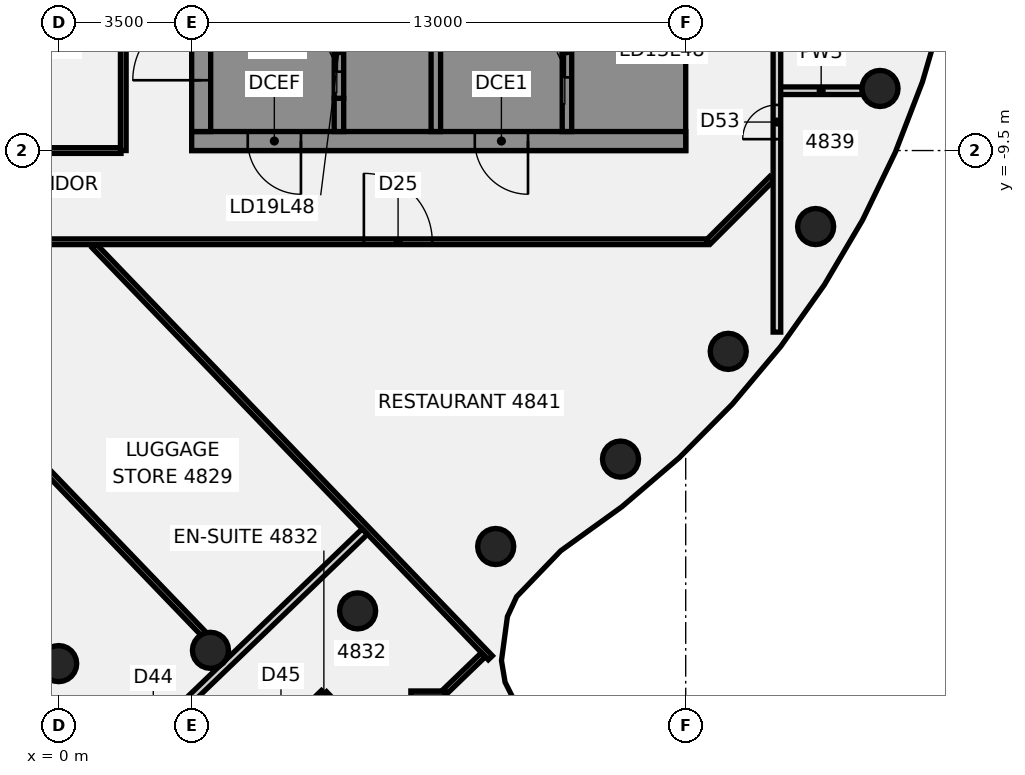
"""IFC4 building model, lengths in metres.
Left out: names, types, materials, properties, quantities, classifications, styles, units other than length and angle.
Written with IfcOpenShell. Run it as: python <this file> out.ifc"""

import sys

from ifc_helpers import new_model, si_unit, direction, frame, frame_2d, origin, origin_2d, place, context, subcontext, project, spatial, polyline, rectangle, circle, outline, extrude, element, fill, save


model = new_model("IFC4")
c1 = context("Model", 3, precision=1e-05, world=origin(), true_north=direction((0.0, 1.0)))
c2 = subcontext(c1, "Body", "Model", "MODEL_VIEW")
j1 = project(units=[si_unit("LENGTHUNIT", "METRE"), si_unit("PLANEANGLEUNIT", "RADIAN")], contexts=[c1])
p1 = place(None, origin())
s1 = spatial("IfcSite", under=j1, at=p1, CompositionType="ELEMENT")
p2 = place(p1, origin())
s2 = spatial("IfcBuilding", under=s1, at=p2, CompositionType="ELEMENT")
p3 = place(p2, frame((0.0, 0.0, 193.3)))
s3 = spatial("IfcBuildingStorey", under=s2, at=p3, CompositionType="ELEMENT", Elevation=193.3)
for number, where, z_axis, x_axis in (
    (1, (0.0, -23.0, -0.14), (0.0, 0.0, 1.0), (1.0, 0.0, 0.0)),
    (2, (3.994, -22.651, -0.14), (0.0, 0.0, 1.0), (1.0, 0.0, 0.0)),
    (3, (7.866, -21.613, -0.14), (0.0, 0.0, 1.0), (1.0, 0.0, 0.0)),
    (4, (11.5, -19.919, -0.14), (0.0, 0.0, 1.0), (1.0, 0.0, 0.0)),
    (5, (14.784, -17.619, -0.14), (0.0, 0.0, 1.0), (1.0, 0.0, 0.0)),
    (6, (17.619, -14.784, -0.14), (0.0, 0.0, 1.0), (1.0, 0.0, 0.0)),
    (7, (19.919, -11.5, -0.14), (0.0, 0.0, 1.0), (1.0, 0.0, 0.0)),
    (8, (21.613, -7.866, -0.14), (0.0, 0.0, 1.0), (1.0, 0.0, 0.0)),
):
    element("IfcColumn", number, at=place(p3, frame(where, z_axis=z_axis, x_axis=x_axis)), inside=s3, PredefinedType="COLUMN", context=c2, shape_type="SweptSolid", body=[
        extrude(circle(Radius=0.475, at=origin_2d()), origin(), (0.0, 0.0, 1.0), 3.6),
    ])
p4 = place(p3, frame((9.718, -24.17, -0.139), z_axis=(0.010573584179, 0.04927561345, 0.998729249215), x_axis=(-0.721101561283, -0.691569981719, 0.041755223636)))
e9 = element("IfcColumn", 9, at=p4, inside=s3, PredefinedType="COLUMN", context=c2, shape_type="SweptSolid", body=[
    extrude(rectangle(XDim=0.9, YDim=0.9, at=origin_2d()), origin(), (0.0, 0.0, 1.0), 3.602),
])
p5 = place(p3, frame((-11.522, -13.769, 0.0), z_axis=(0.0, 0.0, 1.0), x_axis=(0.693150251381, -0.720793124974, 0.0)))
e10 = element("IfcWall", 10, at=p5, inside=s3, PredefinedType="PARTITIONING", context=c2, shape_type="SweptSolid", body=[
    extrude(rectangle(XDim=17.62, YDim=0.15, at=frame_2d((8.81, 0.0))), origin(), (0.0, 0.0, 1.0), 2.864),
])
p6 = place(p5, frame((9.22, 0.0, 0.0)))
e11 = element("IfcOpeningElement", 11, at=p6, cuts=e10, PredefinedType="OPENING", context=c2, shape_type="SweptSolid", body=[
    extrude(rectangle(XDim=1.8, YDim=2.1, at=frame_2d((0.9, 1.05))), frame((0.0, 0.085, 0.0), z_axis=(0.0, -1.0, 0.0), x_axis=(1.0, 0.0, 0.0)), (0.0, 0.0, 1.0), 0.17),
])
p7 = place(p3, frame((-6.002, -12.008, 0.0), z_axis=(0.0, 0.0, 1.0), x_axis=(0.693152131844, -0.720791316624, 0.0)))
e12 = element("IfcWall", 12, at=p7, inside=s3, PredefinedType="PARTITIONING", context=c2, shape_type="SweptSolid", body=[
    extrude(rectangle(XDim=14.159, YDim=0.15, at=frame_2d((7.08, 0.0))), origin(), (0.0, 0.0, 1.0), 2.864),
])
p8 = place(p7, frame((4.65, 0.0, 0.0)))
e13 = element("IfcOpeningElement", 13, at=p8, cuts=e12, PredefinedType="OPENING", context=c2, shape_type="SweptSolid", body=[
    extrude(rectangle(XDim=0.9, YDim=2.1, at=frame_2d((0.45, 1.05))), frame((0.0, 0.085, 0.0), z_axis=(0.0, -1.0, 0.0), x_axis=(1.0, 0.0, 0.0)), (0.0, 0.0, 1.0), 0.17),
])
p9 = place(p3, frame((0.935, -12.008, 0.0), z_axis=(0.0, 0.0, 1.0), x_axis=(0.693163548461, -0.72078033761, 0.0)))
e14 = element("IfcWall", 14, at=p9, inside=s3, PredefinedType="PARTITIONING", context=c2, shape_type="SweptSolid", body=[
    extrude(rectangle(XDim=15.037, YDim=0.15, at=frame_2d((7.519, 0.0))), origin(), (0.0, 0.0, 1.0), 2.864),
])
p10 = place(p3, frame((6.995, -23.792, 0.0), z_axis=(0.0, 0.0, 1.0), x_axis=(0.693326664986, -0.72062343538, 0.0)))
e15 = element("IfcWall", 15, at=p10, inside=s3, PredefinedType="PARTITIONING", context=c2, shape_type="SweptSolid", body=[
    extrude(rectangle(XDim=4.32, YDim=0.15, at=frame_2d((2.16, 0.0))), origin(), (0.0, 0.0, 1.0), 2.864),
])
p11 = place(p3, frame((-17.1, -11.9, 0.0), z_axis=(0.0, 0.0, 1.0), x_axis=(1.0, 0.0, 0.0)))
e16 = element("IfcWall", 16, at=p11, inside=s3, PredefinedType="PARTITIONING", context=c2, shape_type="SweptSolid", body=[
    extrude(rectangle(XDim=34.165, YDim=0.15, at=frame_2d((17.083, 0.0))), origin(), (0.0, 0.0, 1.0), 2.864),
])
p12 = place(p11, frame((8.305, 0.0, 0.0)))
e17 = element("IfcOpeningElement", 17, at=p12, cuts=e16, PredefinedType="OPENING", context=c2, shape_type="SweptSolid", body=[
    extrude(rectangle(XDim=1.8, YDim=2.1, at=frame_2d((0.9, 1.05))), frame((0.0, 0.085, 0.0), z_axis=(0.0, -1.0, 0.0), x_axis=(1.0, 0.0, 0.0)), (0.0, 0.0, 1.0), 0.17),
])
p13 = place(p11, frame((2.1, 0.0, 0.0)))
e18 = element("IfcOpeningElement", 18, at=p13, cuts=e16, PredefinedType="OPENING", context=c2, shape_type="SweptSolid", body=[
    extrude(rectangle(XDim=1.8, YDim=2.1, at=frame_2d((0.9, 1.05))), frame((0.0, 0.085, 0.0), z_axis=(0.0, -1.0, 0.0), x_axis=(1.0, 0.0, 0.0)), (0.0, 0.0, 1.0), 0.17),
])
p14 = place(p11, frame((25.131, 0.0, 0.0)))
e19 = element("IfcOpeningElement", 19, at=p14, cuts=e16, PredefinedType="OPENING", context=c2, shape_type="SweptSolid", body=[
    extrude(rectangle(XDim=1.8, YDim=2.1, at=frame_2d((0.9, 1.05))), frame((0.0, 0.085, 0.0), z_axis=(0.0, -1.0, 0.0), x_axis=(1.0, 0.0, 0.0)), (0.0, 0.0, 1.0), 0.17),
])
p15 = place(p3, frame((-1.64, -9.5, 0.0), z_axis=(0.0, 0.0, 1.0), x_axis=(1.0, 0.0, 0.0)))
e20 = element("IfcWall", 20, at=p15, inside=s3, PredefinedType="PARTITIONING", context=c2, shape_type="SweptSolid", body=[
    extrude(rectangle(XDim=3.28, YDim=0.15, at=frame_2d((1.64, 0.0))), origin(), (0.0, 0.0, 1.0), 2.864),
])
p16 = place(p3, frame((18.985, -7.926, 0.0), z_axis=(0.0, 0.0, 1.0), x_axis=(1.0, 0.0, 0.0)))
e21 = element("IfcWall", 21, at=p16, inside=s3, PredefinedType="PARTITIONING", context=c2, shape_type="SweptSolid", body=[
    extrude(rectangle(XDim=2.159, YDim=0.2, at=frame_2d((1.079, 0.0))), origin(), (0.0, 0.0, 1.0), 2.864),
])
p17 = place(p3, frame((-2.194, -29.383, 0.0), z_axis=(0.0, 0.0, 1.0), x_axis=(0.720785221716, 0.693158469728, 0.0)))
e22 = element("IfcWall", 22, at=p17, inside=s3, PredefinedType="PARTITIONING", context=c2, shape_type="SweptSolid", body=[
    extrude(rectangle(XDim=14.219, YDim=0.2, at=frame_2d((7.109, 0.0))), origin(), (0.0, 0.0, 1.0), 2.864),
])
p18 = place(p17, frame((5.799, 0.0, 0.0)))
e23 = element("IfcOpeningElement", 23, at=p18, cuts=e22, PredefinedType="OPENING", context=c2, shape_type="SweptSolid", body=[
    extrude(rectangle(XDim=1.4, YDim=2.1, at=frame_2d((0.7, 1.05))), frame((0.0, 0.11, 0.0), z_axis=(0.0, -1.0, 0.0), x_axis=(1.0, 0.0, 0.0)), (0.0, 0.0, 1.0), 0.22),
])
p19 = place(p3, frame((5.151, -25.51, 0.0), z_axis=(0.0, 0.0, 1.0), x_axis=(0.720825617884, 0.693116461067, 0.0)))
e24 = element("IfcWall", 24, at=p19, inside=s3, PredefinedType="PARTITIONING", context=c2, shape_type="SweptSolid", body=[
    extrude(rectangle(XDim=2.52, YDim=0.15, at=frame_2d((1.26, 0.0))), origin(), (0.0, 0.0, 1.0), 2.864),
])
p20 = place(p19, frame((0.52, 0.0, 0.0)))
e25 = element("IfcOpeningElement", 25, at=p20, cuts=e24, PredefinedType="OPENING", context=c2, shape_type="SweptSolid", body=[
    extrude(rectangle(XDim=0.9, YDim=2.1, at=frame_2d((0.45, 1.05))), frame((0.0, 0.085, 0.0), z_axis=(0.0, -1.0, 0.0), x_axis=(1.0, 0.0, 0.0)), (0.0, 0.0, 1.0), 0.17),
])
p21 = place(p3, frame((10.155, -23.748, 0.0), z_axis=(0.0, 0.0, 1.0), x_axis=(0.720544060308, 0.693409155662, 0.0)))
e26 = element("IfcWall", 26, at=p21, inside=s3, PredefinedType="PARTITIONING", context=c2, shape_type="SweptSolid", body=[
    extrude(rectangle(XDim=1.413, YDim=0.15, at=frame_2d((0.706, 0.0))), origin(), (0.0, 0.0, 1.0), 2.864),
])
p22 = place(p3, frame((17.1, -11.9, 0.0), z_axis=(0.0, 0.0, 1.0), x_axis=(0.707106781187, 0.707106781187, 0.0)))
e27 = element("IfcWall", 27, at=p22, inside=s3, PredefinedType="PARTITIONING", context=c2, shape_type="SweptSolid", body=[
    extrude(rectangle(XDim=2.355, YDim=0.15, at=frame_2d((1.178, 0.0))), origin(), (0.0, 0.0, 1.0), 2.864),
])
p23 = place(p3, frame((1.7, -9.5, 0.0), z_axis=(0.0, 0.0, 1.0), x_axis=(0.0, 1.0, 0.0)))
e28 = element("IfcWall", 28, at=p23, inside=s3, PredefinedType="PARTITIONING", context=c2, shape_type="SweptSolid", body=[
    extrude(rectangle(XDim=19.0, YDim=0.15, at=frame_2d((9.5, 0.0))), origin(), (0.0, 0.0, 1.0), 2.864),
])
p24 = place(p3, frame((18.9, -14.277, 0.0), z_axis=(0.0, 0.0, 1.0), x_axis=(0.0, 1.0, 0.0)))
e29 = element("IfcWall", 29, at=p24, inside=s3, PredefinedType="PARTITIONING", context=c2, shape_type="SweptSolid", body=[
    extrude(rectangle(XDim=24.693, YDim=0.2, at=frame_2d((12.347, 0.0))), origin(), (0.0, 0.0, 1.0), 2.864),
])
p25 = place(p24, frame((5.077, 0.0, 0.0)))
e30 = element("IfcOpeningElement", 30, at=p25, cuts=e29, PredefinedType="OPENING", context=c2, shape_type="SweptSolid", body=[
    extrude(rectangle(XDim=0.9, YDim=2.1, at=frame_2d((0.45, 1.05))), frame((0.0, 0.11, 0.0), z_axis=(0.0, -1.0, 0.0), x_axis=(1.0, 0.0, 0.0)), (0.0, 0.0, 1.0), 0.22),
])
p26 = place(p24, frame((22.293, 0.0, 0.0)))
e31 = element("IfcOpeningElement", 31, at=p26, cuts=e29, PredefinedType="OPENING", context=c2, shape_type="SweptSolid", body=[
    extrude(rectangle(XDim=0.9, YDim=2.1, at=frame_2d((0.45, 1.05))), frame((0.0, 0.11, 0.0), z_axis=(0.0, -1.0, 0.0), x_axis=(1.0, 0.0, 0.0)), (0.0, 0.0, 1.0), 0.22),
])
p27 = place(p3, frame((16.5, -9.25, 0.0), z_axis=(0.0, 0.0, 1.0), x_axis=(-1.0, 0.0, 0.0)))
e32 = element("IfcWall", 32, at=p27, inside=s3, PredefinedType="SHEAR", context=c2, shape_type="SweptSolid", body=[
    extrude(rectangle(XDim=13.0, YDim=0.5, at=frame_2d((6.5, 0.0))), origin(), (0.0, 0.0, 1.0), 3.46),
])
p28 = place(p27, frame((4.15, 0.0, 0.0)))
e33 = element("IfcOpeningElement", 33, at=p28, cuts=e32, PredefinedType="OPENING", context=c2, shape_type="SweptSolid", body=[
    extrude(rectangle(XDim=1.4, YDim=2.1, at=frame_2d((0.7, 1.05))), frame((0.0, 0.26, 0.0), z_axis=(0.0, -1.0, 0.0), x_axis=(1.0, 0.0, 0.0)), (0.0, 0.0, 1.0), 0.52),
])
p29 = place(p27, frame((10.125, 0.0, 0.0)))
e34 = element("IfcOpeningElement", 34, at=p29, cuts=e32, PredefinedType="OPENING", context=c2, shape_type="SweptSolid", body=[
    extrude(rectangle(XDim=1.4, YDim=2.1, at=frame_2d((0.7, 1.05))), frame((0.0, 0.26, 0.0), z_axis=(0.0, -1.0, 0.0), x_axis=(1.0, 0.0, 0.0)), (0.0, 0.0, 1.0), 0.52),
])
p30 = place(p3, origin())
e35 = element("IfcWall", 35, at=p30, inside=s3, PredefinedType="SHEAR", context=c2, shape_type="SweptSolid", body=[
    extrude(outline(polyline([(13.5, -8.125), (13.5, -9.0), (16.0, -9.0), (16.5, -9.0), (16.5, 9.0), (16.0, 9.0), (13.5, 9.0), (13.5, 8.125), (16.0, 8.125), (16.0, 5.625), (13.5, 5.625), (13.5, 5.375), (16.0, 5.375), (16.0, -5.375), (13.5, -5.375), (13.5, -5.625), (16.0, -5.625), (16.0, -8.125), (13.5, -8.125)])), origin(), (0.0, 0.0, 1.0), 3.46),
])
p31 = place(p3, origin())
e36 = element("IfcWall", 36, at=p31, inside=s3, PredefinedType="SHEAR", context=c2, shape_type="SweptSolid", body=[
    extrude(outline(polyline([(7.5, -8.125), (7.5, -9.0), (9.8, -9.0), (9.8, -8.125), (9.8, -5.625), (9.55, -5.625), (9.55, -8.125), (7.5, -8.125)])), origin(), (0.0, 0.0, 1.0), 3.46),
])
p32 = place(p3, frame((7.375, -9.0, 0.0), z_axis=(0.0, 0.0, 1.0), x_axis=(0.0, 1.0, 0.0)))
e37 = element("IfcWall", 37, at=p32, inside=s3, PredefinedType="SHEAR", context=c2, shape_type="SweptSolid", body=[
    extrude(rectangle(XDim=0.875, YDim=0.25, at=frame_2d((0.438, 0.0))), origin(), (0.0, 0.0, 1.0), 3.46),
])
p33 = place(p3, frame((13.375, -9.0, 0.0), z_axis=(0.0, 0.0, 1.0), x_axis=(0.0, 1.0, 0.0)))
e38 = element("IfcWall", 38, at=p33, inside=s3, PredefinedType="SHEAR", context=c2, shape_type="SweptSolid", body=[
    extrude(rectangle(XDim=18.0, YDim=0.25, at=frame_2d((9.0, 0.0))), origin(), (0.0, 0.0, 1.0), 3.46),
])
p34 = place(p33, frame((1.425, 0.0, 0.0)))
e39 = element("IfcOpeningElement", 39, at=p34, cuts=e38, PredefinedType="OPENING", context=c2, shape_type="SweptSolid", body=[
    extrude(rectangle(XDim=1.4, YDim=2.1, at=frame_2d((0.7, 1.05))), frame((0.0, 0.135, 0.0), z_axis=(0.0, -1.0, 0.0), x_axis=(1.0, 0.0, 0.0)), (0.0, 0.0, 1.0), 0.27),
])
p35 = place(p33, frame((4.854, 0.0, 0.0)))
e40 = element("IfcOpeningElement", 40, at=p35, cuts=e38, PredefinedType="OPENING", context=c2, shape_type="SweptSolid", body=[
    extrude(rectangle(XDim=1.0, YDim=2.1, at=frame_2d((0.5, 1.05))), frame((0.0, 0.135, 0.0), z_axis=(0.0, -1.0, 0.0), x_axis=(1.0, 0.0, 0.0)), (0.0, 0.0, 1.0), 0.27),
])
p36 = place(p33, frame((10.354, 0.0, 0.0)))
e41 = element("IfcOpeningElement", 41, at=p36, cuts=e38, PredefinedType="OPENING", context=c2, shape_type="SweptSolid", body=[
    extrude(rectangle(XDim=1.0, YDim=2.1, at=frame_2d((0.5, 1.05))), frame((0.0, 0.135, 0.0), z_axis=(0.0, -1.0, 0.0), x_axis=(1.0, 0.0, 0.0)), (0.0, 0.0, 1.0), 0.27),
])
p37 = place(p3, frame((9.925, -9.0, 0.0), z_axis=(0.0, 0.0, 1.0), x_axis=(0.0, 1.0, 0.0)))
e42 = element("IfcWall", 42, at=p37, inside=s3, PredefinedType="SHEAR", context=c2, shape_type="SweptSolid", body=[
    extrude(rectangle(XDim=18.0, YDim=0.25, at=frame_2d((9.0, 0.0))), origin(), (0.0, 0.0, 1.0), 3.46),
])
p38 = place(p37, frame((4.275, 0.0, 0.0)))
e43 = element("IfcOpeningElement", 43, at=p38, cuts=e42, PredefinedType="OPENING", context=c2, shape_type="SweptSolid", body=[
    extrude(rectangle(XDim=1.2, YDim=2.1, at=frame_2d((0.6, 1.05))), frame((0.0, 0.135, 0.0), z_axis=(0.0, -1.0, 0.0), x_axis=(1.0, 0.0, 0.0)), (0.0, 0.0, 1.0), 0.27),
])
p39 = place(p37, frame((7.025, 0.0, 0.0)))
e44 = element("IfcOpeningElement", 44, at=p39, cuts=e42, PredefinedType="OPENING", context=c2, shape_type="SweptSolid", body=[
    extrude(rectangle(XDim=1.2, YDim=2.1, at=frame_2d((0.6, 1.05))), frame((0.0, 0.135, 0.0), z_axis=(0.0, -1.0, 0.0), x_axis=(1.0, 0.0, 0.0)), (0.0, 0.0, 1.0), 0.27),
])
p40 = place(p37, frame((9.825, 0.0, 0.0)))
e45 = element("IfcOpeningElement", 45, at=p40, cuts=e42, PredefinedType="OPENING", context=c2, shape_type="SweptSolid", body=[
    extrude(rectangle(XDim=1.1, YDim=2.1, at=frame_2d((0.55, 1.05))), frame((0.0, 0.135, 0.0), z_axis=(0.0, -1.0, 0.0), x_axis=(1.0, 0.0, 0.0)), (0.0, 0.0, 1.0), 0.27),
])
p41 = place(p3, frame((7.375, -8.125, 0.0), z_axis=(0.0, 0.0, 1.0), x_axis=(0.0, 1.0, 0.0)))
e46 = element("IfcWall", 46, at=p41, inside=s3, PredefinedType="SHEAR", context=c2, shape_type="SweptSolid", body=[
    extrude(rectangle(XDim=2.5, YDim=0.25, at=frame_2d((1.25, 0.0))), origin(), (0.0, 0.0, 1.0), 3.46),
])
p42 = place(p41, frame((0.7, 0.0, 0.0)))
e47 = element("IfcOpeningElement", 47, at=p42, cuts=e46, PredefinedType="OPENING", context=c2, shape_type="SweptSolid", body=[
    extrude(rectangle(XDim=1.1, YDim=2.1, at=frame_2d((0.55, 1.05))), frame((0.0, 0.135, 0.0), z_axis=(0.0, -1.0, 0.0), x_axis=(1.0, 0.0, 0.0)), (0.0, 0.0, 1.0), 0.27),
])
p43 = place(p3, frame((3.75, -9.0, 0.0), z_axis=(0.0, 0.0, 1.0), x_axis=(0.0, 1.0, 0.0)))
e48 = element("IfcWall", 48, at=p43, inside=s3, PredefinedType="SHEAR", context=c2, shape_type="SweptSolid", body=[
    extrude(rectangle(XDim=18.0, YDim=0.5, at=frame_2d((9.0, 0.0))), origin(), (0.0, 0.0, 1.0), 3.46),
])
p44 = place(p43, frame((1.35, 0.0, 0.0)))
e49 = element("IfcOpeningElement", 49, at=p44, cuts=e48, PredefinedType="OPENING", context=c2, shape_type="SweptSolid", body=[
    extrude(rectangle(XDim=1.8, YDim=2.1, at=frame_2d((0.9, 1.05))), frame((0.0, 0.26, 0.0), z_axis=(0.0, -1.0, 0.0), x_axis=(1.0, 0.0, 0.0)), (0.0, 0.0, 1.0), 0.52),
])
p45 = place(p43, frame((12.478, 0.0, 0.0)))
e50 = element("IfcOpeningElement", 50, at=p45, cuts=e48, PredefinedType="OPENING", context=c2, shape_type="SweptSolid", body=[
    extrude(rectangle(XDim=1.0, YDim=2.1, at=frame_2d((0.5, 1.05))), frame((0.0, 0.26, 0.0), z_axis=(0.0, -1.0, 0.0), x_axis=(1.0, 0.0, 0.0)), (0.0, 0.0, 1.0), 0.52),
])
p46 = place(p43, frame((16.002, 0.0, 0.0)))
e51 = element("IfcOpeningElement", 51, at=p46, cuts=e48, PredefinedType="OPENING", context=c2, shape_type="SweptSolid", body=[
    extrude(rectangle(XDim=1.0, YDim=2.1, at=frame_2d((0.5, 1.05))), frame((0.0, 0.26, 0.0), z_axis=(0.0, -1.0, 0.0), x_axis=(1.0, 0.0, 0.0)), (0.0, 0.0, 1.0), 0.52),
])
p47 = place(p14, origin())
e52 = element("IfcDoor", 52, at=p47, inside=s3, OperationType="DOUBLE_DOOR_SINGLE_SWING", PredefinedType="DOOR", context=c2, shape_type="SweptSolid", body=[
    extrude(rectangle(XDim=1.8, YDim=2.1, at=frame_2d((0.9, 1.05))), frame((0.0, 0.025, 0.0), z_axis=(0.0, -1.0, 0.0), x_axis=(1.0, 0.0, 0.0)), (0.0, 0.0, 1.0), 0.05),
])
fill(e19, e52)
p48 = place(p25, frame((0.9, 0.0, 0.0), z_axis=(0.0, 0.0, 1.0), x_axis=(-1.0, 0.0, 0.0)))
e53 = element("IfcDoor", 53, at=p48, inside=s3, OperationType="SINGLE_SWING_LEFT", PredefinedType="DOOR", context=c2, shape_type="SweptSolid", body=[
    extrude(rectangle(XDim=0.9, YDim=2.1, at=frame_2d((0.45, 1.05))), frame((0.0, 0.025, 0.0), z_axis=(0.0, -1.0, 0.0), x_axis=(1.0, 0.0, 0.0)), (0.0, 0.0, 1.0), 0.05),
])
fill(e30, e53)
p49 = place(p28, origin())
e54 = element("IfcDoor", 54, at=p49, inside=s3, OperationType="SINGLE_SWING_LEFT", PredefinedType="DOOR", context=c2, shape_type="SweptSolid", body=[
    extrude(rectangle(XDim=1.4, YDim=2.1, at=frame_2d((0.7, 1.05))), frame((0.0, 0.025, 0.0), z_axis=(0.0, -1.0, 0.0), x_axis=(1.0, 0.0, 0.0)), (0.0, 0.0, 1.0), 0.05),
])
fill(e33, e54)
p50 = place(p29, origin())
e55 = element("IfcDoor", 55, at=p50, inside=s3, OperationType="SINGLE_SWING_LEFT", PredefinedType="DOOR", context=c2, shape_type="SweptSolid", body=[
    extrude(rectangle(XDim=1.4, YDim=2.1, at=frame_2d((0.7, 1.05))), frame((0.0, 0.025, 0.0), z_axis=(0.0, -1.0, 0.0), x_axis=(1.0, 0.0, 0.0)), (0.0, 0.0, 1.0), 0.05),
])
fill(e34, e55)
p51 = place(p44, origin())
e56 = element("IfcDoor", 56, at=p51, inside=s3, OperationType="SINGLE_SWING_LEFT", PredefinedType="DOOR", context=c2, shape_type="SweptSolid", body=[
    extrude(rectangle(XDim=1.8, YDim=2.1, at=frame_2d((0.9, 1.05))), frame((0.0, 0.025, 0.0), z_axis=(0.0, -1.0, 0.0), x_axis=(1.0, 0.0, 0.0)), (0.0, 0.0, 1.0), 0.05),
])
fill(e49, e56)
p52 = place(p34, origin())
e57 = element("IfcDoor", 57, at=p52, inside=s3, OperationType="SLIDING_TO_LEFT", PredefinedType="DOOR", context=c2, shape_type="SweptSolid", body=[
    extrude(rectangle(XDim=1.4, YDim=2.1, at=frame_2d((0.7, 1.05))), frame((0.0, 0.025, 0.0), z_axis=(0.0, -1.0, 0.0), x_axis=(1.0, 0.0, 0.0)), (0.0, 0.0, 1.0), 0.05),
])
fill(e39, e57)
p53 = place(p42, origin())
e58 = element("IfcDoor", 58, at=p53, inside=s3, OperationType="SLIDING_TO_LEFT", PredefinedType="DOOR", context=c2, shape_type="SweptSolid", body=[
    extrude(rectangle(XDim=1.1, YDim=2.1, at=frame_2d((0.55, 1.05))), frame((0.0, 0.025, 0.0), z_axis=(0.0, -1.0, 0.0), x_axis=(1.0, 0.0, 0.0)), (0.0, 0.0, 1.0), 0.05),
])
fill(e47, e58)
save(model, sys.argv[1])
